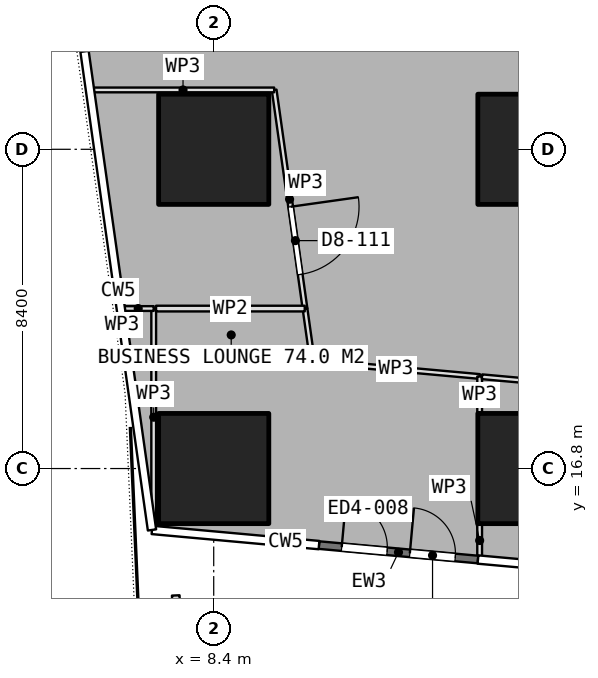
"""IFC4 building model, lengths in metres.
Left out: names, types, materials, properties, quantities, classifications, styles, units other than length and angle.
Written with IfcOpenShell. Run it as: python <this file> out.ifc"""

import sys

from ifc_helpers import new_model, si_unit, direction, frame, frame_2d, origin, origin_2d, place, context, subcontext, project, spatial, rectangle, extrude, element, fill, save


model = new_model("IFC4")
c1 = context("Model", 3, precision=1e-05, world=origin(), true_north=direction((0.0, 1.0)))
c2 = subcontext(c1, "Body", "Model", "MODEL_VIEW")
j1 = project(units=[si_unit("LENGTHUNIT", "METRE"), si_unit("PLANEANGLEUNIT", "RADIAN")], contexts=[c1])
p1 = place(None, origin())
s1 = spatial("IfcSite", under=j1, at=p1, CompositionType="ELEMENT")
p2 = place(p1, origin())
s2 = spatial("IfcBuilding", under=s1, at=p2, CompositionType="ELEMENT")
p3 = place(p2, frame((0.0, 0.0, 90.8)))
s3 = spatial("IfcBuildingStorey", under=s2, at=p3, CompositionType="ELEMENT", Elevation=90.8)
for number, where, z_axis, x_axis in (
    (1, (8.4, 16.8, 0.0), (0.0, 0.0, 1.0), (1.0, 0.0, 0.0)),
    (2, (8.4, 25.2, 0.0), (0.0, 0.0, 1.0), (1.0, 0.0, 0.0)),
    (3, (16.8, 16.8, 0.0), (0.0, 0.0, 1.0), (1.0, 0.0, 0.0)),
    (4, (16.8, 25.2, 0.0), (0.0, 0.0, 1.0), (1.0, 0.0, 0.0)),
):
    element("IfcColumn", number, at=place(p3, frame(where, z_axis=z_axis, x_axis=x_axis)), inside=s3, PredefinedType="COLUMN", context=c2, shape_type="SweptSolid", body=[
        extrude(rectangle(XDim=2.9, YDim=2.9, at=origin_2d()), origin(), (0.0, 0.0, 1.0), 4.5),
    ])
p4 = place(p3, frame((11.171, 14.786, 0.0), z_axis=(0.0, 0.0, 1.0), x_axis=(0.995906536502, -0.090388995754, 0.0)))
e5 = element("IfcWall", 5, at=p4, inside=s3, PredefinedType="SOLIDWALL", context=c2, shape_type="SweptSolid", body=[
    extrude(rectangle(XDim=4.2, YDim=0.2, at=frame_2d((2.1, 0.0))), origin(), (0.0, 0.0, 1.0), 4.25),
])
p5 = place(p4, frame((0.6, 0.0, 0.0)))
e6 = element("IfcOpeningElement", 6, at=p5, cuts=e5, PredefinedType="OPENING", context=c2, shape_type="SweptSolid", body=[
    extrude(rectangle(XDim=1.2, YDim=2.4, at=frame_2d((0.6, 1.2))), frame((0.0, 0.11, 0.0), z_axis=(0.0, -1.0, 0.0), x_axis=(1.0, 0.0, 0.0)), (0.0, 0.0, 1.0), 0.22),
])
p6 = place(p4, frame((2.4, 0.0, 0.0)))
e7 = element("IfcOpeningElement", 7, at=p6, cuts=e5, PredefinedType="OPENING", context=c2, shape_type="SweptSolid", body=[
    extrude(rectangle(XDim=1.2, YDim=2.4, at=frame_2d((0.6, 1.2))), frame((0.0, 0.11, 0.0), z_axis=(0.0, -1.0, 0.0), x_axis=(1.0, 0.0, 0.0)), (0.0, 0.0, 1.0), 0.22),
])
p7 = place(p3, frame((7.401, 13.461, 0.0), z_axis=(0.0, 0.0, 1.0), x_axis=(0.043688555027, -0.999045199258, 0.0)))
e8 = element("IfcWall", 8, at=p7, inside=s3, PredefinedType="USERDEFINED", context=c2, shape_type="SweptSolid", body=[
    extrude(rectangle(XDim=5.817, YDim=0.2, at=frame_2d((2.909, 0.0))), origin(), (0.0, 0.0, 1.0), 0.6),
])
p8 = place(p3, frame((9.991, 26.762, 0.0), z_axis=(0.0, 0.0, 1.0), x_axis=(0.139620596627, -0.990205074213, 0.0)))
e9 = element("IfcWall", 9, at=p8, inside=s3, PredefinedType="PARTITIONING", context=c2, shape_type="SweptSolid", body=[
    extrude(rectangle(XDim=5.809, YDim=0.125, at=frame_2d((2.904, 0.0))), origin(), (0.0, 0.0, 1.0), 4.25),
])
p9 = place(p8, frame((3.104, 0.0, 0.0)))
e10 = element("IfcOpeningElement", 10, at=p9, cuts=e9, PredefinedType="OPENING", context=c2, shape_type="SweptSolid", body=[
    extrude(rectangle(XDim=1.8, YDim=2.1, at=frame_2d((0.9, 1.05))), frame((0.0, 0.073, 0.0), z_axis=(0.0, -1.0, 0.0), x_axis=(1.0, 0.0, 0.0)), (0.0, 0.0, 1.0), 0.145),
])
p10 = place(p3, frame((10.802, 21.01, 0.0), z_axis=(0.0, 0.0, 1.0), x_axis=(0.139764178089, -0.990184818366, 0.0)))
e11 = element("IfcWall", 11, at=p10, inside=s3, PredefinedType="PARTITIONING", context=c2, shape_type="SweptSolid", body=[
    extrude(rectangle(XDim=1.403, YDim=0.125, at=frame_2d((0.701, 0.0))), origin(), (0.0, 0.0, 1.0), 4.25),
])
p11 = place(p3, frame((10.998, 19.621, 0.0), z_axis=(0.0, 0.0, 1.0), x_axis=(0.995909948824, -0.090351390874, 0.0)))
e12 = element("IfcWall", 12, at=p11, inside=s3, PredefinedType="PARTITIONING", context=c2, shape_type="SweptSolid", body=[
    extrude(rectangle(XDim=4.418, YDim=0.125, at=frame_2d((2.209, 0.0))), origin(), (0.0, 0.0, 1.0), 4.25),
])
p12 = place(p3, frame((15.398, 19.222, 0.0), z_axis=(0.0, 0.0, 1.0), x_axis=(0.0, -1.0, 0.0)))
e13 = element("IfcWall", 13, at=p12, inside=s3, PredefinedType="PARTITIONING", context=c2, shape_type="SweptSolid", body=[
    extrude(rectangle(XDim=0.952, YDim=0.125, at=frame_2d((0.476, 0.0))), origin(), (0.0, 0.0, 1.0), 4.25),
])
p13 = place(p3, frame((15.398, 15.33, 0.0), z_axis=(0.0, 0.0, 1.0), x_axis=(0.0, -1.0, 0.0)))
e14 = element("IfcWall", 14, at=p13, inside=s3, PredefinedType="PARTITIONING", context=c2, shape_type="SweptSolid", body=[
    extrude(rectangle(XDim=0.848, YDim=0.125, at=frame_2d((0.424, 0.0))), origin(), (0.0, 0.0, 1.0), 4.25),
])
p14 = place(p3, frame((6.821, 15.291, 0.0), z_axis=(0.0, 0.0, 1.0), x_axis=(0.0, 1.0, 0.0)))
e15 = element("IfcWall", 15, at=p14, inside=s3, PredefinedType="PARTITIONING", context=c2, shape_type="SweptSolid", body=[
    extrude(rectangle(XDim=5.719, YDim=0.125, at=frame_2d((2.859, 0.0))), origin(), (0.0, 0.0, 1.0), 4.25),
])
p15 = place(p3, frame((6.821, 21.01, 0.0), z_axis=(0.0, 0.0, 1.0), x_axis=(-1.0, 0.0, 0.0)))
e16 = element("IfcWall", 16, at=p15, inside=s3, PredefinedType="PARTITIONING", context=c2, shape_type="SweptSolid", body=[
    extrude(rectangle(XDim=0.816, YDim=0.125, at=frame_2d((0.408, 0.0))), origin(), (0.0, 0.0, 1.0), 4.25),
])
p16 = place(p3, frame((5.194, 26.762, 0.0), z_axis=(0.0, 0.0, 1.0), x_axis=(1.0, 0.0, 0.0)))
e17 = element("IfcWall", 17, at=p16, inside=s3, PredefinedType="PARTITIONING", context=c2, shape_type="SweptSolid", body=[
    extrude(rectangle(XDim=4.797, YDim=0.125, at=frame_2d((2.398, 0.0))), origin(), (0.0, 0.0, 1.0), 4.25),
])
p17 = place(p3, frame((15.46, 19.215, 0.0), z_axis=(0.0, 0.0, 1.0), x_axis=(0.995914494184, -0.090301275045, 0.0)))
e18 = element("IfcWall", 18, at=p17, inside=s3, PredefinedType="PARTITIONING", context=c2, shape_type="SweptSolid", body=[
    extrude(rectangle(XDim=3.755, YDim=0.125, at=frame_2d((1.878, 0.0))), origin(), (0.0, 0.0, 1.0), 4.25),
])
p18 = place(p3, frame((10.795, 21.009, 0.0), z_axis=(0.0, 0.0, 1.0), x_axis=(-1.0, 0.0, 0.0)))
e19 = element("IfcWall", 19, at=p18, inside=s3, PredefinedType="PARTITIONING", context=c2, shape_type="SweptSolid", body=[
    extrude(rectangle(XDim=3.912, YDim=0.15, at=frame_2d((1.956, 0.0))), origin(), (0.0, 0.0, 1.0), 4.25),
])
p19 = place(p5, origin())
e20 = element("IfcDoor", 20, at=p19, inside=s3, OperationType="SINGLE_SWING_LEFT", PredefinedType="DOOR", context=c2, shape_type="SweptSolid", body=[
    extrude(rectangle(XDim=1.2, YDim=2.4, at=frame_2d((0.6, 1.2))), frame((0.0, 0.025, 0.0), z_axis=(0.0, -1.0, 0.0), x_axis=(1.0, 0.0, 0.0)), (0.0, 0.0, 1.0), 0.05),
])
fill(e6, e20)
p20 = place(p6, origin())
e21 = element("IfcDoor", 21, at=p20, inside=s3, OperationType="SINGLE_SWING_LEFT", PredefinedType="DOOR", context=c2, shape_type="SweptSolid", body=[
    extrude(rectangle(XDim=1.2, YDim=2.4, at=frame_2d((0.6, 1.2))), frame((0.0, 0.025, 0.0), z_axis=(0.0, -1.0, 0.0), x_axis=(1.0, 0.0, 0.0)), (0.0, 0.0, 1.0), 0.05),
])
fill(e7, e21)
p21 = place(p9, origin())
e22 = element("IfcDoor", 22, at=p21, inside=s3, OperationType="DOUBLE_DOOR_SINGLE_SWING", PredefinedType="DOOR", context=c2, shape_type="SweptSolid", body=[
    extrude(rectangle(XDim=1.8, YDim=2.1, at=frame_2d((0.9, 1.05))), frame((0.0, 0.025, 0.0), z_axis=(0.0, -1.0, 0.0), x_axis=(1.0, 0.0, 0.0)), (0.0, 0.0, 1.0), 0.05),
])
fill(e10, e22)
save(model, sys.argv[1])
